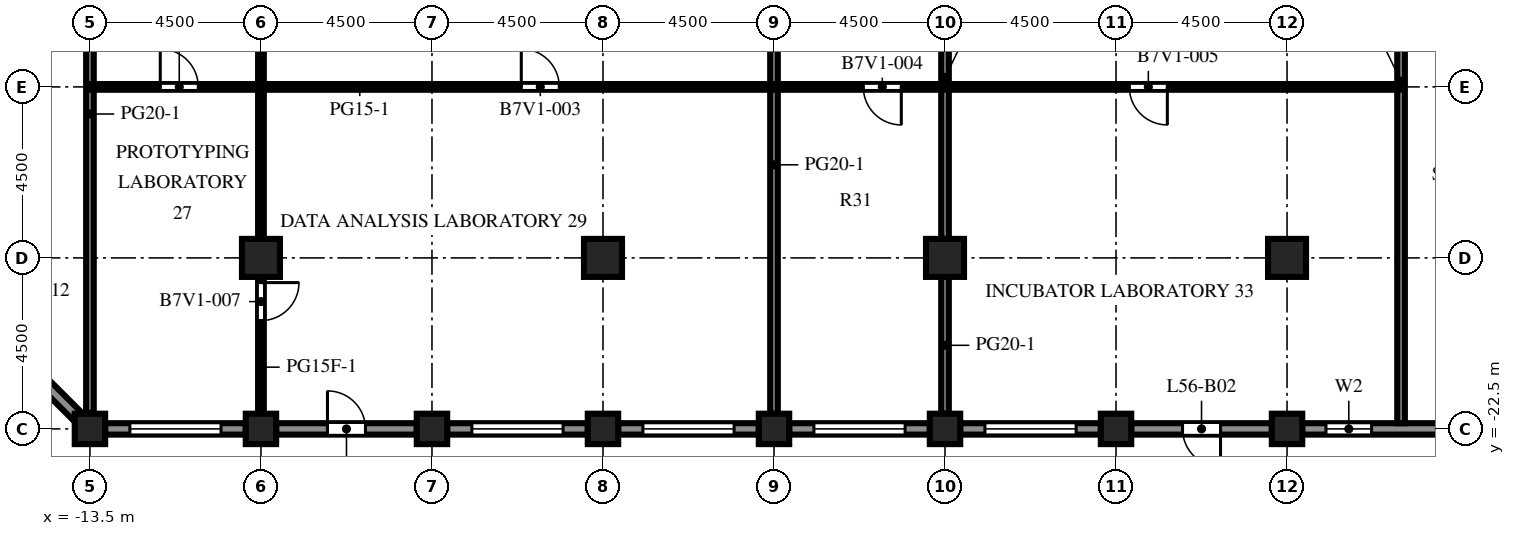
"""IFC4 building model, lengths in metres.
Left out: names, types, materials, properties, quantities, classifications, styles, units other than length and angle.
Written with IfcOpenShell. Run it as: python <this file> out.ifc"""

import sys

from ifc_helpers import new_model, si_unit, direction, frame, frame_2d, origin, origin_2d, place, context, subcontext, project, spatial, rectangle, extrude, element, fill, save


model = new_model("IFC4")
c1 = context("Model", 3, precision=1e-05, world=origin(), true_north=direction((0.0, 1.0)))
c2 = subcontext(c1, "Body", "Model", "MODEL_VIEW")
j1 = project(units=[si_unit("LENGTHUNIT", "METRE"), si_unit("PLANEANGLEUNIT", "RADIAN")], contexts=[c1])
p1 = place(None, origin())
s1 = spatial("IfcSite", under=j1, at=p1, CompositionType="ELEMENT")
p2 = place(p1, origin())
s2 = spatial("IfcBuilding", under=s1, at=p2, CompositionType="ELEMENT")
p3 = place(p2, frame((0.0, 0.0, 248.0)))
s3 = spatial("IfcBuildingStorey", under=s2, at=p3, CompositionType="ELEMENT", Elevation=248.0)
for number, where, z_axis, x_axis in (
    (1, (-13.5, -22.5, 0.0), (0.0, 0.0, 1.0), (1.0, 0.0, 0.0)),
    (2, (-9.0, -22.5, 0.0), (0.0, 0.0, 1.0), (1.0, 0.0, 0.0)),
    (3, (-4.5, -22.5, 0.0), (0.0, 0.0, 1.0), (1.0, 0.0, 0.0)),
    (4, (0.0, -22.5, 0.0), (0.0, 0.0, 1.0), (1.0, 0.0, 0.0)),
    (5, (4.5, -22.5, 0.0), (0.0, 0.0, 1.0), (1.0, 0.0, 0.0)),
    (6, (9.0, -22.5, 0.0), (0.0, 0.0, 1.0), (1.0, 0.0, 0.0)),
    (7, (13.5, -22.5, 0.0), (0.0, 0.0, 1.0), (1.0, 0.0, 0.0)),
    (8, (18.0, -22.5, 0.0), (0.0, 0.0, 1.0), (1.0, 0.0, 0.0)),
):
    element("IfcColumn", number, at=place(p3, frame(where, z_axis=z_axis, x_axis=x_axis)), inside=s3, PredefinedType="COLUMN", context=c2, shape_type="SweptSolid", body=[
        extrude(rectangle(XDim=0.8, YDim=0.8, at=origin_2d()), origin(), (0.0, 0.0, 1.0), 4.1),
    ])
for number, where, z_axis, x_axis in (
    (9, (-9.0, -18.0, 0.0), (0.0, 0.0, 1.0), (1.0, 0.0, 0.0)),
    (10, (0.0, -18.0, 0.0), (0.0, 0.0, 1.0), (1.0, 0.0, 0.0)),
    (11, (9.0, -18.0, 0.0), (0.0, 0.0, 1.0), (1.0, 0.0, 0.0)),
    (12, (18.0, -18.0, 0.0), (0.0, 0.0, 1.0), (1.0, 0.0, 0.0)),
):
    element("IfcColumn", number, at=place(p3, frame(where, z_axis=z_axis, x_axis=x_axis)), inside=s3, PredefinedType="COLUMN", context=c2, shape_type="SweptSolid", body=[
        extrude(rectangle(XDim=1.0, YDim=1.0, at=origin_2d()), origin(), (0.0, 0.0, 1.0), 4.1),
    ])
p4 = place(p3, frame((-9.4, -22.5, 0.0), z_axis=(0.0, 0.0, 1.0), x_axis=(-1.0, 0.0, 0.0)))
e13 = element("IfcWall", 13, at=p4, inside=s3, PredefinedType="SOLIDWALL", context=c2, shape_type="SweptSolid", body=[
    extrude(rectangle(XDim=3.7, YDim=0.3, at=frame_2d((1.85, 0.0))), origin(), (0.0, 0.0, 1.0), 2.85),
])
p5 = place(p4, frame((0.65, 0.0, 0.8)))
e14 = element("IfcOpeningElement", 14, at=p5, cuts=e13, PredefinedType="OPENING", context=c2, shape_type="SweptSolid", body=[
    extrude(rectangle(XDim=2.4, YDim=1.7, at=frame_2d((1.2, 0.85))), frame((0.0, 0.16, 0.0), z_axis=(0.0, -1.0, 0.0), x_axis=(1.0, 0.0, 0.0)), (0.0, 0.0, 1.0), 0.32),
])
p6 = place(p3, frame((-4.9, -22.5, 0.0), z_axis=(0.0, 0.0, 1.0), x_axis=(-1.0, 0.0, 0.0)))
e15 = element("IfcWall", 15, at=p6, inside=s3, PredefinedType="SOLIDWALL", context=c2, shape_type="SweptSolid", body=[
    extrude(rectangle(XDim=3.7, YDim=0.3, at=frame_2d((1.85, 0.0))), origin(), (0.0, 0.0, 1.0), 2.85),
])
p7 = place(p6, frame((1.35, 0.0, 0.0)))
e16 = element("IfcOpeningElement", 16, at=p7, cuts=e15, PredefinedType="OPENING", context=c2, shape_type="SweptSolid", body=[
    extrude(rectangle(XDim=1.0, YDim=2.2, at=frame_2d((0.5, 1.1))), frame((0.0, 0.16, 0.0), z_axis=(0.0, -1.0, 0.0), x_axis=(1.0, 0.0, 0.0)), (0.0, 0.0, 1.0), 0.32),
])
p8 = place(p3, frame((-0.4, -22.5, 0.0), z_axis=(0.0, 0.0, 1.0), x_axis=(-1.0, 0.0, 0.0)))
e17 = element("IfcWall", 17, at=p8, inside=s3, PredefinedType="SOLIDWALL", context=c2, shape_type="SweptSolid", body=[
    extrude(rectangle(XDim=3.7, YDim=0.3, at=frame_2d((1.85, 0.0))), origin(), (0.0, 0.0, 1.0), 2.85),
])
p9 = place(p8, frame((0.65, 0.0, 0.8)))
e18 = element("IfcOpeningElement", 18, at=p9, cuts=e17, PredefinedType="OPENING", context=c2, shape_type="SweptSolid", body=[
    extrude(rectangle(XDim=2.4, YDim=1.7, at=frame_2d((1.2, 0.85))), frame((0.0, 0.16, 0.0), z_axis=(0.0, -1.0, 0.0), x_axis=(1.0, 0.0, 0.0)), (0.0, 0.0, 1.0), 0.32),
])
p10 = place(p3, frame((4.1, -22.5, 0.0), z_axis=(0.0, 0.0, 1.0), x_axis=(-1.0, 0.0, 0.0)))
e19 = element("IfcWall", 19, at=p10, inside=s3, PredefinedType="SOLIDWALL", context=c2, shape_type="SweptSolid", body=[
    extrude(rectangle(XDim=3.7, YDim=0.3, at=frame_2d((1.85, 0.0))), origin(), (0.0, 0.0, 1.0), 2.85),
])
p11 = place(p10, frame((0.65, 0.0, 0.8)))
e20 = element("IfcOpeningElement", 20, at=p11, cuts=e19, PredefinedType="OPENING", context=c2, shape_type="SweptSolid", body=[
    extrude(rectangle(XDim=2.4, YDim=1.7, at=frame_2d((1.2, 0.85))), frame((0.0, 0.16, 0.0), z_axis=(0.0, -1.0, 0.0), x_axis=(1.0, 0.0, 0.0)), (0.0, 0.0, 1.0), 0.32),
])
p12 = place(p3, frame((8.6, -22.5, 0.0), z_axis=(0.0, 0.0, 1.0), x_axis=(-1.0, 0.0, 0.0)))
e21 = element("IfcWall", 21, at=p12, inside=s3, PredefinedType="SOLIDWALL", context=c2, shape_type="SweptSolid", body=[
    extrude(rectangle(XDim=3.7, YDim=0.3, at=frame_2d((1.85, 0.0))), origin(), (0.0, 0.0, 1.0), 2.85),
])
p13 = place(p12, frame((0.65, 0.0, 0.8)))
e22 = element("IfcOpeningElement", 22, at=p13, cuts=e21, PredefinedType="OPENING", context=c2, shape_type="SweptSolid", body=[
    extrude(rectangle(XDim=2.4, YDim=1.7, at=frame_2d((1.2, 0.85))), frame((0.0, 0.16, 0.0), z_axis=(0.0, -1.0, 0.0), x_axis=(1.0, 0.0, 0.0)), (0.0, 0.0, 1.0), 0.32),
])
p14 = place(p3, frame((13.1, -22.5, 0.0), z_axis=(0.0, 0.0, 1.0), x_axis=(-1.0, 0.0, 0.0)))
e23 = element("IfcWall", 23, at=p14, inside=s3, PredefinedType="SOLIDWALL", context=c2, shape_type="SweptSolid", body=[
    extrude(rectangle(XDim=3.7, YDim=0.3, at=frame_2d((1.85, 0.0))), origin(), (0.0, 0.0, 1.0), 2.85),
])
p15 = place(p14, frame((0.65, 0.0, 0.8)))
e24 = element("IfcOpeningElement", 24, at=p15, cuts=e23, PredefinedType="OPENING", context=c2, shape_type="SweptSolid", body=[
    extrude(rectangle(XDim=2.4, YDim=1.7, at=frame_2d((1.2, 0.85))), frame((0.0, 0.16, 0.0), z_axis=(0.0, -1.0, 0.0), x_axis=(1.0, 0.0, 0.0)), (0.0, 0.0, 1.0), 0.32),
])
p16 = place(p3, frame((17.6, -22.5, 0.0), z_axis=(0.0, 0.0, 1.0), x_axis=(-1.0, 0.0, 0.0)))
e25 = element("IfcWall", 25, at=p16, inside=s3, PredefinedType="SOLIDWALL", context=c2, shape_type="SweptSolid", body=[
    extrude(rectangle(XDim=3.7, YDim=0.3, at=frame_2d((1.85, 0.0))), origin(), (0.0, 0.0, 1.0), 2.85),
])
p17 = place(p16, frame((1.35, 0.0, 0.0)))
e26 = element("IfcOpeningElement", 26, at=p17, cuts=e25, PredefinedType="OPENING", context=c2, shape_type="SweptSolid", body=[
    extrude(rectangle(XDim=1.0, YDim=2.2, at=frame_2d((0.5, 1.1))), frame((0.0, 0.16, 0.0), z_axis=(0.0, -1.0, 0.0), x_axis=(1.0, 0.0, 0.0)), (0.0, 0.0, 1.0), 0.32),
])
p18 = place(p3, frame((22.1, -22.5, 0.0), z_axis=(0.0, 0.0, 1.0), x_axis=(-1.0, 0.0, 0.0)))
e27 = element("IfcWall", 27, at=p18, inside=s3, PredefinedType="SOLIDWALL", context=c2, shape_type="SweptSolid", body=[
    extrude(rectangle(XDim=3.7, YDim=0.3, at=frame_2d((1.85, 0.0))), origin(), (0.0, 0.0, 1.0), 2.85),
])
p19 = place(p18, frame((1.875, 0.0, 0.8)))
e28 = element("IfcOpeningElement", 28, at=p19, cuts=e27, PredefinedType="OPENING", context=c2, shape_type="SweptSolid", body=[
    extrude(rectangle(XDim=1.2, YDim=1.7, at=frame_2d((0.6, 0.85))), frame((0.0, 0.16, 0.0), z_axis=(0.0, -1.0, 0.0), x_axis=(1.0, 0.0, 0.0)), (0.0, 0.0, 1.0), 0.32),
])
p20 = place(p3, frame((-13.794, -22.206, 0.0), z_axis=(0.0, 0.0, 1.0), x_axis=(-0.707106781187, 0.707106781187, 0.0)))
e29 = element("IfcWall", 29, at=p20, inside=s3, PredefinedType="SOLIDWALL", context=c2, shape_type="SweptSolid", body=[
    extrude(rectangle(XDim=5.532, YDim=0.3, at=frame_2d((2.766, 0.0))), origin(), (0.0, 0.0, 1.0), 2.85),
])
p21 = place(p20, frame((2.166, 0.0, 0.0)))
e30 = element("IfcOpeningElement", 30, at=p21, cuts=e29, PredefinedType="OPENING", context=c2, shape_type="SweptSolid", body=[
    extrude(rectangle(XDim=1.2, YDim=2.2, at=frame_2d((0.6, 1.1))), frame((0.0, 0.16, 0.0), z_axis=(0.0, -1.0, 0.0), x_axis=(1.0, 0.0, 0.0)), (0.0, 0.0, 1.0), 0.32),
])
p22 = place(p3, frame((-13.5, -22.077, 0.0), z_axis=(0.0, 0.0, 1.0), x_axis=(0.0, 1.0, 0.0)))
e31 = element("IfcWall", 31, at=p22, inside=s3, PredefinedType="PARTITIONING", context=c2, shape_type="SweptSolid", body=[
    extrude(rectangle(XDim=25.327, YDim=0.2, at=frame_2d((12.664, 0.0))), origin(), (0.0, 0.0, 1.0), 3.65),
])
p23 = place(p22, frame((15.727, 0.0, 0.0)))
e32 = element("IfcOpeningElement", 32, at=p23, cuts=e31, PredefinedType="OPENING", context=c2, shape_type="SweptSolid", body=[
    extrude(rectangle(XDim=1.0, YDim=2.1, at=frame_2d((0.5, 1.05))), frame((0.0, 0.11, 0.0), z_axis=(0.0, -1.0, 0.0), x_axis=(1.0, 0.0, 0.0)), (0.0, 0.0, 1.0), 0.22),
])
p24 = place(p3, frame((-9.0, -18.5, 0.0), z_axis=(0.0, 0.0, 1.0), x_axis=(0.0, -1.0, 0.0)))
e33 = element("IfcWall", 33, at=p24, inside=s3, PredefinedType="PARTITIONING", context=c2, shape_type="SweptSolid", body=[
    extrude(rectangle(XDim=3.6, YDim=0.15, at=frame_2d((1.8, 0.0))), origin(), (0.0, 0.0, 1.0), 3.65),
])
p25 = place(p24, frame((0.15, 0.0, 0.0)))
e34 = element("IfcOpeningElement", 34, at=p25, cuts=e33, PredefinedType="OPENING", context=c2, shape_type="SweptSolid", body=[
    extrude(rectangle(XDim=1.0, YDim=2.1, at=frame_2d((0.5, 1.05))), frame((0.0, 0.085, 0.0), z_axis=(0.0, -1.0, 0.0), x_axis=(1.0, 0.0, 0.0)), (0.0, 0.0, 1.0), 0.17),
])
p26 = place(p3, frame((-9.0, -17.5, 0.0), z_axis=(0.0, 0.0, 1.0), x_axis=(0.0, 1.0, 0.0)))
e35 = element("IfcWall", 35, at=p26, inside=s3, PredefinedType="PARTITIONING", context=c2, shape_type="SweptSolid", body=[
    extrude(rectangle(XDim=8.5, YDim=0.15, at=frame_2d((4.25, 0.0))), origin(), (0.0, 0.0, 1.0), 3.65),
])
p27 = place(p3, frame((4.5, -22.1, 0.0), z_axis=(0.0, 0.0, 1.0), x_axis=(0.0, 1.0, 0.0)))
e36 = element("IfcWall", 36, at=p27, inside=s3, PredefinedType="PARTITIONING", context=c2, shape_type="SweptSolid", body=[
    extrude(rectangle(XDim=13.1, YDim=0.2, at=frame_2d((6.55, 0.0))), origin(), (0.0, 0.0, 1.0), 3.65),
])
p28 = place(p3, frame((9.0, -22.1, 0.0), z_axis=(0.0, 0.0, 1.0), x_axis=(0.0, 1.0, 0.0)))
e37 = element("IfcWall", 37, at=p28, inside=s3, PredefinedType="PARTITIONING", context=c2, shape_type="SweptSolid", body=[
    extrude(rectangle(XDim=3.6, YDim=0.2, at=frame_2d((1.8, 0.0))), origin(), (0.0, 0.0, 1.0), 3.65),
])
p29 = place(p3, frame((9.0, -17.5, 0.0), z_axis=(0.0, 0.0, 1.0), x_axis=(0.0, 1.0, 0.0)))
e38 = element("IfcWall", 38, at=p29, inside=s3, PredefinedType="PARTITIONING", context=c2, shape_type="SweptSolid", body=[
    extrude(rectangle(XDim=8.5, YDim=0.2, at=frame_2d((4.25, 0.0))), origin(), (0.0, 0.0, 1.0), 3.65),
])
p30 = place(p3, frame((21.0, 3.25, 0.0), z_axis=(0.0, 0.0, 1.0), x_axis=(0.0, -1.0, 0.0)))
e39 = element("IfcWall", 39, at=p30, inside=s3, PredefinedType="PARTITIONING", context=c2, shape_type="SweptSolid", body=[
    extrude(rectangle(XDim=25.6, YDim=0.2, at=frame_2d((12.8, 0.0))), origin(), (0.0, 0.0, 1.0), 3.65),
])
p31 = place(p30, frame((6.6, 0.0, 0.0)))
e40 = element("IfcOpeningElement", 40, at=p31, cuts=e39, PredefinedType="OPENING", context=c2, shape_type="SweptSolid", body=[
    extrude(rectangle(XDim=1.0, YDim=2.1, at=frame_2d((0.5, 1.05))), frame((0.0, 0.11, 0.0), z_axis=(0.0, -1.0, 0.0), x_axis=(1.0, 0.0, 0.0)), (0.0, 0.0, 1.0), 0.22),
])
p32 = place(p3, frame((21.0, -13.5, 0.0), z_axis=(0.0, 0.0, 1.0), x_axis=(-1.0, 0.0, 0.0)))
e41 = element("IfcWall", 41, at=p32, inside=s3, PredefinedType="PARTITIONING", context=c2, shape_type="SweptSolid", body=[
    extrude(rectangle(XDim=34.5, YDim=0.15, at=frame_2d((17.25, 0.0))), origin(), (0.0, 0.0, 1.0), 3.65),
])
p33 = place(p32, frame((31.65, 0.0, 0.0)))
e42 = element("IfcOpeningElement", 42, at=p33, cuts=e41, PredefinedType="OPENING", context=c2, shape_type="SweptSolid", body=[
    extrude(rectangle(XDim=1.0, YDim=2.1, at=frame_2d((0.5, 1.05))), frame((0.0, 0.085, 0.0), z_axis=(0.0, -1.0, 0.0), x_axis=(1.0, 0.0, 0.0)), (0.0, 0.0, 1.0), 0.17),
])
p34 = place(p32, frame((22.15, 0.0, 0.0)))
e43 = element("IfcOpeningElement", 43, at=p34, cuts=e41, PredefinedType="OPENING", context=c2, shape_type="SweptSolid", body=[
    extrude(rectangle(XDim=1.0, YDim=2.1, at=frame_2d((0.5, 1.05))), frame((0.0, 0.085, 0.0), z_axis=(0.0, -1.0, 0.0), x_axis=(1.0, 0.0, 0.0)), (0.0, 0.0, 1.0), 0.17),
])
p35 = place(p32, frame((13.15, 0.0, 0.0)))
e44 = element("IfcOpeningElement", 44, at=p35, cuts=e41, PredefinedType="OPENING", context=c2, shape_type="SweptSolid", body=[
    extrude(rectangle(XDim=1.0, YDim=2.1, at=frame_2d((0.5, 1.05))), frame((0.0, 0.085, 0.0), z_axis=(0.0, -1.0, 0.0), x_axis=(1.0, 0.0, 0.0)), (0.0, 0.0, 1.0), 0.17),
])
p36 = place(p32, frame((6.15, 0.0, 0.0)))
e45 = element("IfcOpeningElement", 45, at=p36, cuts=e41, PredefinedType="OPENING", context=c2, shape_type="SweptSolid", body=[
    extrude(rectangle(XDim=1.0, YDim=2.1, at=frame_2d((0.5, 1.05))), frame((0.0, 0.085, 0.0), z_axis=(0.0, -1.0, 0.0), x_axis=(1.0, 0.0, 0.0)), (0.0, 0.0, 1.0), 0.17),
])
p37 = place(p5, origin())
e46 = element("IfcWindow", 46, at=p37, inside=s3, PartitioningType="SINGLE_PANEL", PredefinedType="WINDOW", context=c2, shape_type="SweptSolid", body=[
    extrude(rectangle(XDim=2.4, YDim=1.7, at=frame_2d((1.2, 0.85))), frame((0.0, 0.03, 0.0), z_axis=(0.0, -1.0, 0.0), x_axis=(1.0, 0.0, 0.0)), (0.0, 0.0, 1.0), 0.06),
])
fill(e14, e46)
p38 = place(p7, origin())
e47 = element("IfcDoor", 47, at=p38, inside=s3, OperationType="SINGLE_SWING_RIGHT", PredefinedType="DOOR", context=c2, shape_type="SweptSolid", body=[
    extrude(rectangle(XDim=1.0, YDim=2.2, at=frame_2d((0.5, 1.1))), frame((0.0, 0.025, 0.0), z_axis=(0.0, -1.0, 0.0), x_axis=(1.0, 0.0, 0.0)), (0.0, 0.0, 1.0), 0.05),
])
fill(e16, e47)
p39 = place(p9, origin())
e48 = element("IfcWindow", 48, at=p39, inside=s3, PartitioningType="SINGLE_PANEL", PredefinedType="WINDOW", context=c2, shape_type="SweptSolid", body=[
    extrude(rectangle(XDim=2.4, YDim=1.7, at=frame_2d((1.2, 0.85))), frame((0.0, 0.03, 0.0), z_axis=(0.0, -1.0, 0.0), x_axis=(1.0, 0.0, 0.0)), (0.0, 0.0, 1.0), 0.06),
])
fill(e18, e48)
p40 = place(p11, origin())
e49 = element("IfcWindow", 49, at=p40, inside=s3, PartitioningType="SINGLE_PANEL", PredefinedType="WINDOW", context=c2, shape_type="SweptSolid", body=[
    extrude(rectangle(XDim=2.4, YDim=1.7, at=frame_2d((1.2, 0.85))), frame((0.0, 0.03, 0.0), z_axis=(0.0, -1.0, 0.0), x_axis=(1.0, 0.0, 0.0)), (0.0, 0.0, 1.0), 0.06),
])
fill(e20, e49)
p41 = place(p13, origin())
e50 = element("IfcWindow", 50, at=p41, inside=s3, PartitioningType="SINGLE_PANEL", PredefinedType="WINDOW", context=c2, shape_type="SweptSolid", body=[
    extrude(rectangle(XDim=2.4, YDim=1.7, at=frame_2d((1.2, 0.85))), frame((0.0, 0.03, 0.0), z_axis=(0.0, -1.0, 0.0), x_axis=(1.0, 0.0, 0.0)), (0.0, 0.0, 1.0), 0.06),
])
fill(e22, e50)
p42 = place(p15, origin())
e51 = element("IfcWindow", 51, at=p42, inside=s3, PartitioningType="SINGLE_PANEL", PredefinedType="WINDOW", context=c2, shape_type="SweptSolid", body=[
    extrude(rectangle(XDim=2.4, YDim=1.7, at=frame_2d((1.2, 0.85))), frame((0.0, 0.03, 0.0), z_axis=(0.0, -1.0, 0.0), x_axis=(1.0, 0.0, 0.0)), (0.0, 0.0, 1.0), 0.06),
])
fill(e24, e51)
p43 = place(p17, origin())
e52 = element("IfcDoor", 52, at=p43, inside=s3, OperationType="SINGLE_SWING_LEFT", PredefinedType="DOOR", context=c2, shape_type="SweptSolid", body=[
    extrude(rectangle(XDim=1.0, YDim=2.2, at=frame_2d((0.5, 1.1))), frame((0.0, 0.025, 0.0), z_axis=(0.0, -1.0, 0.0), x_axis=(1.0, 0.0, 0.0)), (0.0, 0.0, 1.0), 0.05),
])
fill(e26, e52)
p44 = place(p19, origin())
e53 = element("IfcWindow", 53, at=p44, inside=s3, PartitioningType="SINGLE_PANEL", PredefinedType="WINDOW", context=c2, shape_type="SweptSolid", body=[
    extrude(rectangle(XDim=1.2, YDim=1.7, at=frame_2d((0.6, 0.85))), frame((0.0, 0.03, 0.0), z_axis=(0.0, -1.0, 0.0), x_axis=(1.0, 0.0, 0.0)), (0.0, 0.0, 1.0), 0.06),
])
fill(e28, e53)
p45 = place(p33, origin())
e54 = element("IfcDoor", 54, at=p45, inside=s3, OperationType="SINGLE_SWING_RIGHT", PredefinedType="DOOR", context=c2, shape_type="SweptSolid", body=[
    extrude(rectangle(XDim=1.0, YDim=2.1, at=frame_2d((0.5, 1.05))), frame((0.0, 0.025, 0.0), z_axis=(0.0, -1.0, 0.0), x_axis=(1.0, 0.0, 0.0)), (0.0, 0.0, 1.0), 0.05),
])
fill(e42, e54)
p46 = place(p34, origin())
e55 = element("IfcDoor", 55, at=p46, inside=s3, OperationType="SINGLE_SWING_RIGHT", PredefinedType="DOOR", context=c2, shape_type="SweptSolid", body=[
    extrude(rectangle(XDim=1.0, YDim=2.1, at=frame_2d((0.5, 1.05))), frame((0.0, 0.025, 0.0), z_axis=(0.0, -1.0, 0.0), x_axis=(1.0, 0.0, 0.0)), (0.0, 0.0, 1.0), 0.05),
])
fill(e43, e55)
p47 = place(p35, origin())
e56 = element("IfcDoor", 56, at=p47, inside=s3, OperationType="SINGLE_SWING_LEFT", PredefinedType="DOOR", context=c2, shape_type="SweptSolid", body=[
    extrude(rectangle(XDim=1.0, YDim=2.1, at=frame_2d((0.5, 1.05))), frame((0.0, 0.025, 0.0), z_axis=(0.0, -1.0, 0.0), x_axis=(1.0, 0.0, 0.0)), (0.0, 0.0, 1.0), 0.05),
])
fill(e44, e56)
p48 = place(p36, origin())
e57 = element("IfcDoor", 57, at=p48, inside=s3, OperationType="SINGLE_SWING_LEFT", PredefinedType="DOOR", context=c2, shape_type="SweptSolid", body=[
    extrude(rectangle(XDim=1.0, YDim=2.1, at=frame_2d((0.5, 1.05))), frame((0.0, 0.025, 0.0), z_axis=(0.0, -1.0, 0.0), x_axis=(1.0, 0.0, 0.0)), (0.0, 0.0, 1.0), 0.05),
])
fill(e45, e57)
p49 = place(p25, origin())
e58 = element("IfcDoor", 58, at=p49, inside=s3, OperationType="SINGLE_SWING_LEFT", PredefinedType="DOOR", context=c2, shape_type="SweptSolid", body=[
    extrude(rectangle(XDim=1.0, YDim=2.1, at=frame_2d((0.5, 1.05))), frame((0.0, 0.025, 0.0), z_axis=(0.0, -1.0, 0.0), x_axis=(1.0, 0.0, 0.0)), (0.0, 0.0, 1.0), 0.05),
])
fill(e34, e58)
save(model, sys.argv[1])
